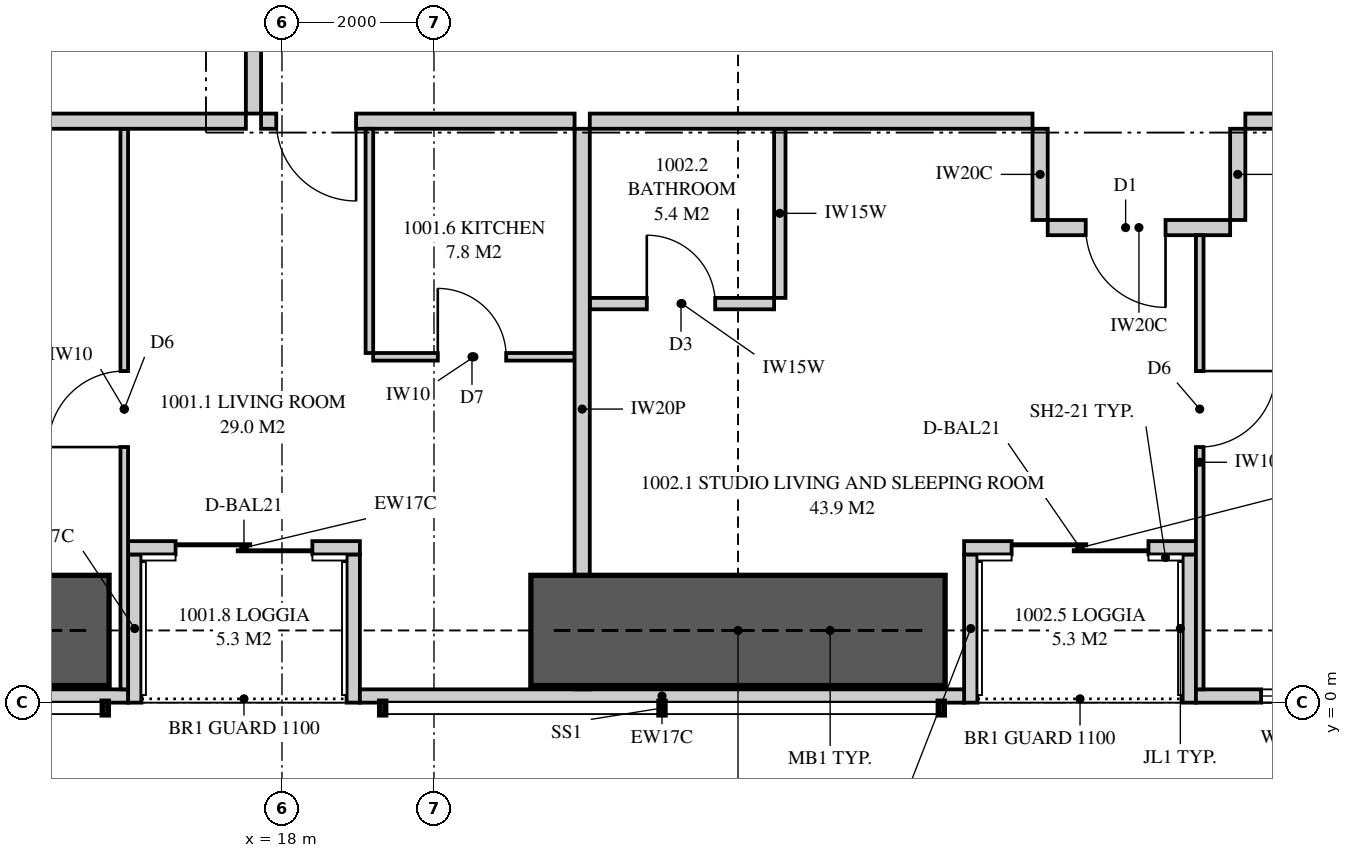
"""IFC4 building model, lengths in metres.
Left out: names, types, materials, properties, quantities, classifications, styles, units other than length and angle.
Written with IfcOpenShell. Run it as: python <this file> out.ifc"""

import sys

from ifc_helpers import new_model, si_unit, direction, frame, frame_2d, origin, place, context, subcontext, project, spatial, polyline, rectangle, outline, extrude, element, fill, save


model = new_model("IFC4")
c1 = context("Model", 3, precision=1e-05, world=origin(), true_north=direction((0.0, 1.0)))
c2 = subcontext(c1, "Body", "Model", "MODEL_VIEW")
j1 = project(units=[si_unit("LENGTHUNIT", "METRE"), si_unit("PLANEANGLEUNIT", "RADIAN")], contexts=[c1])
p1 = place(None, origin())
s1 = spatial("IfcSite", under=j1, at=p1, CompositionType="ELEMENT")
p2 = place(p1, origin())
s2 = spatial("IfcBuilding", under=s1, at=p2, CompositionType="ELEMENT")
p3 = place(p2, frame((0.0, 0.0, 41.1)))
s3 = spatial("IfcBuildingStorey", under=s2, at=p3, CompositionType="ELEMENT", Elevation=41.1)
p4 = place(p3, frame((5.051, 0.087, 0.0), z_axis=(0.0, 0.0, 1.0), x_axis=(1.0, 0.0, 0.0)))
e1 = element("IfcWall", 1, at=p4, inside=s3, PredefinedType="SOLIDWALL", context=c2, shape_type="SweptSolid", body=[
    extrude(outline(polyline([(0.0, 0.0), (10.924, 0.0), (10.924, 2.15), (7.949, 2.15), (7.949, 3.11), (7.793, 3.11), (7.793, 2.15), (7.745, 2.15), (7.745, 3.11), (0.0, 3.11), (0.0, 0.0)])), frame((0.0, 0.087, 0.0), z_axis=(0.0, -1.0, 0.0), x_axis=(1.0, 0.0, 0.0)), (0.0, 0.0, 1.0), 0.175),
])
p5 = place(p4, frame((2.199, 0.0, 0.4)))
e2 = element("IfcOpeningElement", 2, at=p5, cuts=e1, PredefinedType="OPENING", context=c2, shape_type="SweptSolid", body=[
    extrude(rectangle(XDim=1.8, YDim=1.7, at=frame_2d((0.9, 0.85))), frame((0.0, 0.097, 0.0), z_axis=(0.0, -1.0, 0.0), x_axis=(1.0, 0.0, 0.0)), (0.0, 0.0, 1.0), 0.195),
])
p6 = place(p3, frame((19.025, 0.087, 0.0), z_axis=(0.0, 0.0, 1.0), x_axis=(1.0, 0.0, 0.0)))
e3 = element("IfcWall", 3, at=p6, inside=s3, PredefinedType="SOLIDWALL", context=c2, shape_type="SweptSolid", body=[
    extrude(rectangle(XDim=7.95, YDim=0.175, at=frame_2d((3.975, 0.0))), origin(), (0.0, 0.0, 1.0), 2.15),
])
p7 = place(p3, frame((30.025, 0.087, 0.0), z_axis=(0.0, 0.0, 1.0), x_axis=(1.0, 0.0, 0.0)))
e4 = element("IfcWall", 4, at=p7, inside=s3, PredefinedType="SOLIDWALL", context=c2, shape_type="SweptSolid", body=[
    extrude(outline(polyline([(0.0, 0.0), (8.075, 0.0), (8.075, 3.11), (5.179, 3.11), (5.179, 2.15), (5.131, 2.15), (5.131, 3.11), (4.975, 3.11), (4.975, 2.15), (0.0, 2.15), (0.0, 0.0)])), frame((0.0, 0.087, 0.0), z_axis=(0.0, -1.0, 0.0), x_axis=(1.0, 0.0, 0.0)), (0.0, 0.0, 1.0), 0.175),
])
p8 = place(p7, frame((0.857, 0.0, 0.4)))
e5 = element("IfcOpeningElement", 5, at=p8, cuts=e4, PredefinedType="OPENING", context=c2, shape_type="SweptSolid", body=[
    extrude(rectangle(XDim=1.2, YDim=1.7, at=frame_2d((0.6, 0.85))), frame((0.0, 0.097, 0.0), z_axis=(0.0, -1.0, 0.0), x_axis=(1.0, 0.0, 0.0)), (0.0, 0.0, 1.0), 0.195),
])
p9 = place(p3, frame((15.975, 2.038, 0.0), z_axis=(0.0, 0.0, 1.0), x_axis=(1.0, 0.0, 0.0)))
e6 = element("IfcWall", 6, at=p9, inside=s3, PredefinedType="SOLIDWALL", context=c2, shape_type="SweptSolid", body=[
    extrude(rectangle(XDim=3.05, YDim=0.175, at=frame_2d((1.525, 0.0))), origin(), (0.0, 0.0, 1.0), 3.11),
])
p10 = place(p9, frame((0.625, 0.0, 0.0)))
e7 = element("IfcOpeningElement", 7, at=p10, cuts=e6, PredefinedType="OPENING", context=c2, shape_type="SweptSolid", body=[
    extrude(rectangle(XDim=1.8, YDim=2.1, at=frame_2d((0.9, 1.05))), frame((0.0, 0.097, 0.0), z_axis=(0.0, -1.0, 0.0), x_axis=(1.0, 0.0, 0.0)), (0.0, 0.0, 1.0), 0.195),
])
for number, where, z_axis, x_axis in (
    (8, (16.062, 0.0, 0.0), (0.0, 0.0, 1.0), (0.0, 1.0, 0.0)),
    (9, (18.938, 0.0, 0.0), (0.0, 0.0, 1.0), (0.0, 1.0, 0.0)),
):
    element("IfcWall", number, at=place(p3, frame(where, z_axis=z_axis, x_axis=x_axis)), inside=s3, PredefinedType="SOLIDWALL", context=c2, shape_type="SweptSolid", body=[
        extrude(outline(polyline([(0.0, 0.0), (1.95, 0.0), (1.95, 3.11), (1.75, 3.11), (1.75, 2.15), (0.15, 2.15), (0.15, 3.11), (0.0, 3.11), (0.0, 0.0)])), frame((0.0, 0.087, 0.0), z_axis=(0.0, -1.0, 0.0), x_axis=(1.0, 0.0, 0.0)), (0.0, 0.0, 1.0), 0.175),
    ])
p11 = place(p3, frame((26.975, 2.038, 0.0), z_axis=(0.0, 0.0, 1.0), x_axis=(1.0, 0.0, 0.0)))
e10 = element("IfcWall", 10, at=p11, inside=s3, PredefinedType="SOLIDWALL", context=c2, shape_type="SweptSolid", body=[
    extrude(rectangle(XDim=3.05, YDim=0.175, at=frame_2d((1.525, 0.0))), origin(), (0.0, 0.0, 1.0), 3.11),
])
p12 = place(p11, frame((0.625, 0.0, 0.0)))
e11 = element("IfcOpeningElement", 11, at=p12, cuts=e10, PredefinedType="OPENING", context=c2, shape_type="SweptSolid", body=[
    extrude(rectangle(XDim=1.8, YDim=2.1, at=frame_2d((0.9, 1.05))), frame((0.0, 0.097, 0.0), z_axis=(0.0, -1.0, 0.0), x_axis=(1.0, 0.0, 0.0)), (0.0, 0.0, 1.0), 0.195),
])
for number, where, z_axis, x_axis in (
    (12, (27.062, 0.0, 0.0), (0.0, 0.0, 1.0), (0.0, 1.0, 0.0)),
    (13, (29.938, 0.0, 0.0), (0.0, 0.0, 1.0), (0.0, 1.0, 0.0)),
):
    element("IfcWall", number, at=place(p3, frame(where, z_axis=z_axis, x_axis=x_axis)), inside=s3, PredefinedType="SOLIDWALL", context=c2, shape_type="SweptSolid", body=[
        extrude(outline(polyline([(0.0, 0.0), (1.95, 0.0), (1.95, 3.11), (1.75, 3.11), (1.75, 2.15), (0.15, 2.15), (0.15, 3.11), (0.0, 3.11), (0.0, 0.0)])), frame((0.0, 0.087, 0.0), z_axis=(0.0, -1.0, 0.0), x_axis=(1.0, 0.0, 0.0)), (0.0, 0.0, 1.0), 0.175),
    ])
p13 = place(p3, frame((21.95, 0.175, 0.0), z_axis=(0.0, 0.0, 1.0), x_axis=(0.0, 1.0, 0.0)))
e14 = element("IfcWall", 14, at=p13, inside=s3, PredefinedType="PARTITIONING", context=c2, shape_type="SweptSolid", body=[
    extrude(outline(polyline([(0.529, 2.15), (0.0, 2.15), (0.0, 0.0), (0.529, 0.0), (0.529, 0.09), (1.021, 0.09), (1.021, 0.0), (7.375, 0.0), (7.375, 3.11), (1.685, 3.11), (1.685, 2.15), (1.021, 2.15), (1.021, 2.06), (0.529, 2.06), (0.529, 2.15)])), frame((0.0, 0.1, 0.0), z_axis=(0.0, -1.0, 0.0), x_axis=(1.0, 0.0, 0.0)), (0.0, 0.0, 1.0), 0.2),
])
p14 = place(p3, frame((17.725, 7.65, 0.0), z_axis=(0.0, 0.0, 1.0), x_axis=(1.0, 0.0, 0.0)))
e15 = element("IfcWall", 15, at=p14, inside=s3, PredefinedType="PARTITIONING", context=c2, shape_type="SweptSolid", body=[
    extrude(rectangle(XDim=4.125, YDim=0.2, at=frame_2d((2.062, 0.0))), origin(), (0.0, 0.0, 1.0), 3.11),
])
p15 = place(p14, frame((0.2, 0.0, 0.0)))
e16 = element("IfcOpeningElement", 16, at=p15, cuts=e15, PredefinedType="OPENING", context=c2, shape_type="SweptSolid", body=[
    extrude(rectangle(XDim=1.05, YDim=2.2, at=frame_2d((0.525, 1.1))), frame((0.0, 0.11, 0.0), z_axis=(0.0, -1.0, 0.0), x_axis=(1.0, 0.0, 0.0)), (0.0, 0.0, 1.0), 0.22),
])
p16 = place(p3, frame((19.2, 4.55, 0.0), z_axis=(0.0, 0.0, 1.0), x_axis=(1.0, 0.0, 0.0)))
e17 = element("IfcWall", 17, at=p16, inside=s3, PredefinedType="PARTITIONING", context=c2, shape_type="SweptSolid", body=[
    extrude(rectangle(XDim=2.65, YDim=0.1, at=frame_2d((1.325, 0.0))), origin(), (0.0, 0.0, 1.0), 3.11),
])
p17 = place(p16, frame((0.85, 0.0, 0.0)))
e18 = element("IfcOpeningElement", 18, at=p17, cuts=e17, PredefinedType="OPENING", context=c2, shape_type="SweptSolid", body=[
    extrude(rectangle(XDim=0.9, YDim=2.1, at=frame_2d((0.45, 1.05))), frame((0.0, 0.06, 0.0), z_axis=(0.0, -1.0, 0.0), x_axis=(1.0, 0.0, 0.0)), (0.0, 0.0, 1.0), 0.12),
])
p18 = place(p3, frame((19.15, 4.6, 0.0), z_axis=(0.0, 0.0, 1.0), x_axis=(0.0, 1.0, 0.0)))
e19 = element("IfcWall", 19, at=p18, inside=s3, PredefinedType="PARTITIONING", context=c2, shape_type="SweptSolid", body=[
    extrude(rectangle(XDim=2.95, YDim=0.1, at=frame_2d((1.475, 0.0))), origin(), (0.0, 0.0, 1.0), 3.11),
])
p19 = place(p3, frame((15.925, 0.175, 0.0), z_axis=(0.0, 0.0, 1.0), x_axis=(0.0, 1.0, 0.0)))
e20 = element("IfcWall", 20, at=p19, inside=s3, PredefinedType="PARTITIONING", context=c2, shape_type="SweptSolid", body=[
    extrude(outline(polyline([(0.0, 0.0), (7.375, 0.0), (7.375, 3.11), (1.635, 3.11), (1.635, 2.15), (0.0, 2.15), (0.0, 3.11), (0.0, 0.0)])), frame((0.0, 0.05, 0.0), z_axis=(0.0, -1.0, 0.0), x_axis=(1.0, 0.0, 0.0)), (0.0, 0.0, 1.0), 0.1),
])
p20 = place(p19, frame((3.188, 0.0, 0.0)))
e21 = element("IfcOpeningElement", 21, at=p20, cuts=e20, PredefinedType="OPENING", context=c2, shape_type="SweptSolid", body=[
    extrude(rectangle(XDim=1.0, YDim=2.1, at=frame_2d((0.5, 1.05))), frame((0.0, 0.06, 0.0), z_axis=(0.0, -1.0, 0.0), x_axis=(1.0, 0.0, 0.0)), (0.0, 0.0, 1.0), 0.12),
])
p21 = place(p3, frame((22.05, 7.65, 0.0), z_axis=(0.0, 0.0, 1.0), x_axis=(1.0, 0.0, 0.0)))
e22 = element("IfcWall", 22, at=p21, inside=s3, PredefinedType="PARTITIONING", context=c2, shape_type="SweptSolid", body=[
    extrude(outline(polyline([(0.0, 0.0), (5.825, 0.0), (5.825, 3.11), (2.287, 3.11), (2.287, 2.541), (1.613, 2.541), (1.613, 3.11), (0.0, 3.11), (0.0, 0.0)])), frame((0.0, 0.1, 0.0), z_axis=(0.0, -1.0, 0.0), x_axis=(1.0, 0.0, 0.0)), (0.0, 0.0, 1.0), 0.2),
])
p22 = place(p3, frame((22.05, 5.25, 0.0), z_axis=(0.0, 0.0, 1.0), x_axis=(1.0, 0.0, 0.0)))
e23 = element("IfcWall", 23, at=p22, inside=s3, PredefinedType="PLUMBINGWALL", context=c2, shape_type="SweptSolid", body=[
    extrude(outline(polyline([(0.0, 0.0), (2.425, 0.0), (2.425, 3.11), (2.262, 3.11), (2.262, 2.541), (1.638, 2.541), (1.638, 3.11), (0.0, 3.11), (0.0, 0.0)])), frame((0.0, 0.075, 0.0), z_axis=(0.0, -1.0, 0.0), x_axis=(1.0, 0.0, 0.0)), (0.0, 0.0, 1.0), 0.15),
])
p23 = place(p22, frame((0.75, 0.0, 0.0)))
e24 = element("IfcOpeningElement", 24, at=p23, cuts=e23, PredefinedType="OPENING", context=c2, shape_type="SweptSolid", body=[
    extrude(rectangle(XDim=0.9, YDim=2.1, at=frame_2d((0.45, 1.05))), frame((0.0, 0.085, 0.0), z_axis=(0.0, -1.0, 0.0), x_axis=(1.0, 0.0, 0.0)), (0.0, 0.0, 1.0), 0.17),
])
p24 = place(p3, frame((24.55, 5.325, 0.0), z_axis=(0.0, 0.0, 1.0), x_axis=(0.0, 1.0, 0.0)))
e25 = element("IfcWall", 25, at=p24, inside=s3, PredefinedType="PLUMBINGWALL", context=c2, shape_type="SweptSolid", body=[
    extrude(rectangle(XDim=2.225, YDim=0.15, at=frame_2d((1.113, 0.0))), origin(), (0.0, 0.0, 1.0), 3.11),
])
p25 = place(p3, frame((30.075, 0.175, 0.0), z_axis=(0.0, 0.0, 1.0), x_axis=(0.0, 1.0, 0.0)))
e26 = element("IfcWall", 26, at=p25, inside=s3, PredefinedType="PARTITIONING", context=c2, shape_type="SweptSolid", body=[
    extrude(outline(polyline([(0.0, 0.0), (5.975, 0.0), (5.975, 3.11), (1.635, 3.11), (1.635, 2.15), (0.0, 2.15), (0.0, 3.11), (0.0, 0.0)])), frame((0.0, 0.05, 0.0), z_axis=(0.0, -1.0, 0.0), x_axis=(1.0, 0.0, 0.0)), (0.0, 0.0, 1.0), 0.1),
])
p26 = place(p25, frame((3.188, 0.0, 0.0)))
e27 = element("IfcOpeningElement", 27, at=p26, cuts=e26, PredefinedType="OPENING", context=c2, shape_type="SweptSolid", body=[
    extrude(rectangle(XDim=1.0, YDim=2.1, at=frame_2d((0.5, 1.05))), frame((0.0, 0.06, 0.0), z_axis=(0.0, -1.0, 0.0), x_axis=(1.0, 0.0, 0.0)), (0.0, 0.0, 1.0), 0.12),
])
p27 = place(p3, frame((2.0, 7.65, 0.0), z_axis=(0.0, 0.0, 1.0), x_axis=(1.0, 0.0, 0.0)))
e28 = element("IfcWall", 28, at=p27, inside=s3, PredefinedType="PARTITIONING", context=c2, shape_type="SweptSolid", body=[
    extrude(outline(polyline([(0.0, 0.0), (15.525, 0.0), (15.525, 3.11), (11.337, 3.11), (11.337, 2.541), (10.663, 2.541), (10.663, 3.11), (9.51, 3.11), (9.51, 2.51), (6.89, 2.51), (6.89, 3.11), (2.969, 3.11), (2.969, 2.541), (2.74, 2.541), (2.74, 2.15), (0.896, 2.15), (0.896, 3.11), (0.0, 3.11), (0.0, 0.0)])), frame((0.0, 0.1, 0.0), z_axis=(0.0, -1.0, 0.0), x_axis=(1.0, 0.0, 0.0)), (0.0, 0.0, 1.0), 0.2),
])
p28 = place(p3, frame((17.625, 7.75, 0.0), z_axis=(0.0, 0.0, 1.0), x_axis=(0.0, 1.0, 0.0)))
e29 = element("IfcWall", 29, at=p28, inside=s3, PredefinedType="PARTITIONING", context=c2, shape_type="SweptSolid", body=[
    extrude(outline(polyline([(0.0, 0.0), (6.15, 0.0), (6.15, 3.11), (5.587, 3.11), (5.587, 2.541), (4.913, 2.541), (4.913, 3.11), (0.0, 3.11), (0.0, 0.0)])), frame((0.0, 0.1, 0.0), z_axis=(0.0, -1.0, 0.0), x_axis=(1.0, 0.0, 0.0)), (0.0, 0.0, 1.0), 0.2),
])
p29 = place(p28, frame((2.175, 0.0, 0.0)))
e30 = element("IfcOpeningElement", 30, at=p29, cuts=e29, PredefinedType="OPENING", context=c2, shape_type="SweptSolid", body=[
    extrude(rectangle(XDim=1.8, YDim=2.1, at=frame_2d((0.9, 1.05))), frame((0.0, 0.11, 0.0), z_axis=(0.0, -1.0, 0.0), x_axis=(1.0, 0.0, 0.0)), (0.0, 0.0, 1.0), 0.22),
])
p30 = place(p3, frame((30.675, 7.65, 0.0), z_axis=(0.0, 0.0, 1.0), x_axis=(1.0, 0.0, 0.0)))
e31 = element("IfcWall", 31, at=p30, inside=s3, PredefinedType="PARTITIONING", context=c2, shape_type="SweptSolid", body=[
    extrude(outline(polyline([(0.0, 0.0), (5.425, 0.0), (5.425, 3.11), (4.662, 3.11), (4.662, 2.541), (3.988, 2.541), (3.988, 3.11), (0.0, 3.11), (0.0, 0.0)])), frame((0.0, 0.1, 0.0), z_axis=(0.0, -1.0, 0.0), x_axis=(1.0, 0.0, 0.0)), (0.0, 0.0, 1.0), 0.2),
])
p31 = place(p3, frame((28.075, 6.25, 0.0), z_axis=(0.0, 0.0, 1.0), x_axis=(1.0, 0.0, 0.0)))
e32 = element("IfcWall", 32, at=p31, inside=s3, PredefinedType="PARTITIONING", context=c2, shape_type="SweptSolid", body=[
    extrude(rectangle(XDim=2.4, YDim=0.2, at=frame_2d((1.2, 0.0))), origin(), (0.0, 0.0, 1.0), 3.11),
])
p32 = place(p31, frame((0.5, 0.0, 0.0)))
e33 = element("IfcOpeningElement", 33, at=p32, cuts=e32, PredefinedType="OPENING", context=c2, shape_type="SweptSolid", body=[
    extrude(rectangle(XDim=1.05, YDim=2.2, at=frame_2d((0.525, 1.1))), frame((0.0, 0.11, 0.0), z_axis=(0.0, -1.0, 0.0), x_axis=(1.0, 0.0, 0.0)), (0.0, 0.0, 1.0), 0.22),
])
for number, where, z_axis, x_axis in (
    (34, (27.975, 7.55, 0.0), (0.0, 0.0, 1.0), (0.0, -1.0, 0.0)),
    (35, (30.575, 7.55, 0.0), (0.0, 0.0, 1.0), (0.0, -1.0, 0.0)),
):
    element("IfcWall", number, at=place(p3, frame(where, z_axis=z_axis, x_axis=x_axis)), inside=s3, PredefinedType="PARTITIONING", context=c2, shape_type="SweptSolid", body=[
        extrude(rectangle(XDim=1.2, YDim=0.2, at=frame_2d((0.6, 0.0))), origin(), (0.0, 0.0, 1.0), 3.11),
    ])
for number, where, z_axis, x_axis in (
    (36, (10.275, 0.95, 0.0), (0.0, 0.0, 1.0), (1.0, 0.0, 0.0)),
    (37, (21.275, 0.95, 0.0), (0.0, 0.0, 1.0), (1.0, 0.0, 0.0)),
):
    element("IfcWall", number, at=place(p3, frame(where, z_axis=z_axis, x_axis=x_axis)), inside=s3, PredefinedType="SHEAR", context=c2, shape_type="SweptSolid", body=[
        extrude(rectangle(XDim=5.45, YDim=1.45, at=frame_2d((2.725, 0.0))), origin(), (0.0, 0.0, 1.0), 3.35),
    ])
p33 = place(p10, origin())
e38 = element("IfcDoor", 38, at=p33, inside=s3, OperationType="SLIDING_TO_LEFT", PredefinedType="DOOR", context=c2, shape_type="SweptSolid", body=[
    extrude(rectangle(XDim=1.8, YDim=2.1, at=frame_2d((0.9, 1.05))), frame((0.0, 0.025, 0.0), z_axis=(0.0, -1.0, 0.0), x_axis=(1.0, 0.0, 0.0)), (0.0, 0.0, 1.0), 0.05),
])
fill(e7, e38)
p34 = place(p12, origin())
e39 = element("IfcDoor", 39, at=p34, inside=s3, OperationType="SLIDING_TO_LEFT", PredefinedType="DOOR", context=c2, shape_type="SweptSolid", body=[
    extrude(rectangle(XDim=1.8, YDim=2.1, at=frame_2d((0.9, 1.05))), frame((0.0, 0.025, 0.0), z_axis=(0.0, -1.0, 0.0), x_axis=(1.0, 0.0, 0.0)), (0.0, 0.0, 1.0), 0.05),
])
fill(e11, e39)
p35 = place(p8, origin())
e40 = element("IfcWindow", 40, at=p35, inside=s3, PartitioningType="SINGLE_PANEL", PredefinedType="WINDOW", context=c2, shape_type="SweptSolid", body=[
    extrude(rectangle(XDim=1.2, YDim=1.7, at=frame_2d((0.6, 0.85))), frame((0.0, 0.03, 0.0), z_axis=(0.0, -1.0, 0.0), x_axis=(1.0, 0.0, 0.0)), (0.0, 0.0, 1.0), 0.06),
])
fill(e5, e40)
p36 = place(p15, frame((1.05, 0.0, 0.0), z_axis=(0.0, 0.0, 1.0), x_axis=(-1.0, 0.0, 0.0)))
e41 = element("IfcDoor", 41, at=p36, inside=s3, OperationType="SINGLE_SWING_LEFT", PredefinedType="DOOR", context=c2, shape_type="SweptSolid", body=[
    extrude(rectangle(XDim=1.05, YDim=2.2, at=frame_2d((0.525, 1.1))), frame((0.0, 0.025, 0.0), z_axis=(0.0, -1.0, 0.0), x_axis=(1.0, 0.0, 0.0)), (0.0, 0.0, 1.0), 0.05),
])
fill(e16, e41)
p37 = place(p17, origin())
e42 = element("IfcDoor", 42, at=p37, inside=s3, OperationType="SINGLE_SWING_LEFT", PredefinedType="DOOR", context=c2, shape_type="SweptSolid", body=[
    extrude(rectangle(XDim=0.9, YDim=2.1, at=frame_2d((0.45, 1.05))), frame((0.0, 0.025, 0.0), z_axis=(0.0, -1.0, 0.0), x_axis=(1.0, 0.0, 0.0)), (0.0, 0.0, 1.0), 0.05),
])
fill(e18, e42)
p38 = place(p20, origin())
e43 = element("IfcDoor", 43, at=p38, inside=s3, OperationType="SINGLE_SWING_LEFT", PredefinedType="DOOR", context=c2, shape_type="SweptSolid", body=[
    extrude(rectangle(XDim=1.0, YDim=2.1, at=frame_2d((0.5, 1.05))), frame((0.0, 0.025, 0.0), z_axis=(0.0, -1.0, 0.0), x_axis=(1.0, 0.0, 0.0)), (0.0, 0.0, 1.0), 0.05),
])
fill(e21, e43)
p39 = place(p32, frame((1.05, 0.0, 0.0), z_axis=(0.0, 0.0, 1.0), x_axis=(-1.0, 0.0, 0.0)))
e44 = element("IfcDoor", 44, at=p39, inside=s3, OperationType="SINGLE_SWING_LEFT", PredefinedType="DOOR", context=c2, shape_type="SweptSolid", body=[
    extrude(rectangle(XDim=1.05, YDim=2.2, at=frame_2d((0.525, 1.1))), frame((0.0, 0.025, 0.0), z_axis=(0.0, -1.0, 0.0), x_axis=(1.0, 0.0, 0.0)), (0.0, 0.0, 1.0), 0.05),
])
fill(e33, e44)
p40 = place(p23, origin())
e45 = element("IfcDoor", 45, at=p40, inside=s3, OperationType="SINGLE_SWING_LEFT", PredefinedType="DOOR", context=c2, shape_type="SweptSolid", body=[
    extrude(rectangle(XDim=0.9, YDim=2.1, at=frame_2d((0.45, 1.05))), frame((0.0, 0.025, 0.0), z_axis=(0.0, -1.0, 0.0), x_axis=(1.0, 0.0, 0.0)), (0.0, 0.0, 1.0), 0.05),
])
fill(e24, e45)
p41 = place(p26, frame((1.0, 0.0, 0.0), z_axis=(0.0, 0.0, 1.0), x_axis=(-1.0, 0.0, 0.0)))
e46 = element("IfcDoor", 46, at=p41, inside=s3, OperationType="SINGLE_SWING_LEFT", PredefinedType="DOOR", context=c2, shape_type="SweptSolid", body=[
    extrude(rectangle(XDim=1.0, YDim=2.1, at=frame_2d((0.5, 1.05))), frame((0.0, 0.025, 0.0), z_axis=(0.0, -1.0, 0.0), x_axis=(1.0, 0.0, 0.0)), (0.0, 0.0, 1.0), 0.05),
])
fill(e27, e46)
save(model, sys.argv[1])
